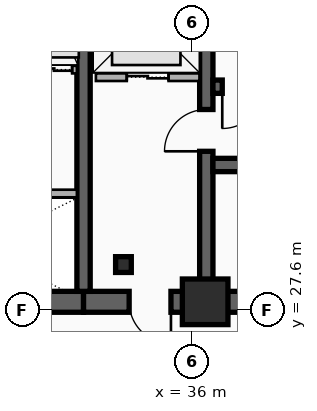
"""IFC4 building model, lengths in metres.
Left out: names, types, materials, properties, quantities, classifications, styles, units other than length and angle.
Written with IfcOpenShell. Run it as: python <this file> out.ifc"""

import sys

from ifc_helpers import new_model, si_unit, direction, frame, frame_2d, origin, origin_2d, place, context, subcontext, project, spatial, rectangle, i_section, extrude, element, fill, save


model = new_model("IFC4")
c1 = context("Model", 3, precision=1e-05, world=origin(), true_north=direction((0.0, 1.0)))
c2 = subcontext(c1, "Body", "Model", "MODEL_VIEW")
j1 = project(units=[si_unit("LENGTHUNIT", "METRE"), si_unit("PLANEANGLEUNIT", "RADIAN")], contexts=[c1])
p1 = place(None, origin())
s1 = spatial("IfcSite", under=j1, at=p1, CompositionType="ELEMENT")
p2 = place(p1, origin())
s2 = spatial("IfcBuilding", under=s1, at=p2, CompositionType="ELEMENT")
p3 = place(p2, frame((0.0, 0.0, 166.1)))
s3 = spatial("IfcBuildingStorey", under=s2, at=p3, CompositionType="ELEMENT", Elevation=166.1)
p4 = place(p3, frame((33.15, 27.82, 0.0), z_axis=(0.0, 0.0, 1.0), x_axis=(-1.0, 0.0, 0.0)))
e1 = element("IfcWall", 1, at=p4, inside=s3, PredefinedType="SHEAR", context=c2, shape_type="SweptSolid", body=[
    extrude(rectangle(XDim=11.97, YDim=0.55, at=frame_2d((5.985, 0.0))), origin(), (0.0, 0.0, 1.0), 3.55),
])
p5 = place(p4, frame((6.1, 0.0, 0.0)))
e2 = element("IfcOpeningElement", 2, at=p5, cuts=e1, PredefinedType="OPENING", context=c2, shape_type="SweptSolid", body=[
    extrude(rectangle(XDim=1.6, YDim=2.2, at=frame_2d((0.8, 1.1))), frame((0.0, 0.285, 0.0), z_axis=(0.0, -1.0, 0.0), x_axis=(1.0, 0.0, 0.0)), (0.0, 0.0, 1.0), 0.57),
])
p6 = place(p3, frame((45.38, 27.82, 0.0), z_axis=(0.0, 0.0, 1.0), x_axis=(-1.0, 0.0, 0.0)))
e3 = element("IfcWall", 3, at=p6, inside=s3, PredefinedType="SHEAR", context=c2, shape_type="SweptSolid", body=[
    extrude(rectangle(XDim=12.23, YDim=0.55, at=frame_2d((6.115, 0.0))), origin(), (0.0, 0.0, 1.0), 3.55),
])
p7 = place(p6, frame((9.93, 0.0, 0.0)))
e4 = element("IfcOpeningElement", 4, at=p7, cuts=e3, PredefinedType="OPENING", context=c2, shape_type="SweptSolid", body=[
    extrude(rectangle(XDim=1.1, YDim=2.15, at=frame_2d((0.55, 1.075))), frame((0.0, 0.285, 0.0), z_axis=(0.0, -1.0, 0.0), x_axis=(1.0, 0.0, 0.0)), (0.0, 0.0, 1.0), 0.57),
])
p8 = place(p6, frame((6.23, 0.0, 0.0)))
e5 = element("IfcOpeningElement", 5, at=p8, cuts=e3, PredefinedType="OPENING", context=c2, shape_type="SweptSolid", body=[
    extrude(rectangle(XDim=1.1, YDim=2.15, at=frame_2d((0.55, 1.075))), frame((0.0, 0.285, 0.0), z_axis=(0.0, -1.0, 0.0), x_axis=(1.0, 0.0, 0.0)), (0.0, 0.0, 1.0), 0.57),
])
p9 = place(p3, frame((33.15, 28.095, 0.0), z_axis=(0.0, 0.0, 1.0), x_axis=(0.0, 1.0, 0.0)))
e6 = element("IfcWall", 6, at=p9, inside=s3, PredefinedType="SHEAR", context=c2, shape_type="SweptSolid", body=[
    extrude(rectangle(XDim=8.68, YDim=0.35, at=frame_2d((4.34, 0.0))), origin(), (0.0, 0.0, 1.0), 3.55),
])
p10 = place(p3, frame((36.38, 28.095, 0.0), z_axis=(0.0, 0.0, 1.0), x_axis=(0.0, 1.0, 0.0)))
e7 = element("IfcWall", 7, at=p10, inside=s3, PredefinedType="SHEAR", context=c2, shape_type="SweptSolid", body=[
    extrude(rectangle(XDim=8.68, YDim=0.35, at=frame_2d((4.34, 0.0))), origin(), (0.0, 0.0, 1.0), 3.55),
])
p11 = place(p10, frame((3.685, 0.0, 0.0)))
e8 = element("IfcOpeningElement", 8, at=p11, cuts=e7, PredefinedType="OPENING", context=c2, shape_type="SweptSolid", body=[
    extrude(rectangle(XDim=1.1, YDim=2.15, at=frame_2d((0.55, 1.075))), frame((0.0, 0.185, 0.0), z_axis=(0.0, -1.0, 0.0), x_axis=(1.0, 0.0, 0.0)), (0.0, 0.0, 1.0), 0.37),
])
p12 = place(p3, frame((45.105, 33.48, 0.0), z_axis=(0.0, 0.0, 1.0), x_axis=(-1.0, 0.0, 0.0)))
e9 = element("IfcWall", 9, at=p12, inside=s3, PredefinedType="SHEAR", context=c2, shape_type="SweptSolid", body=[
    extrude(rectangle(XDim=8.55, YDim=0.35, at=frame_2d((4.275, 0.0))), origin(), (0.0, 0.0, 1.0), 3.55),
])
p13 = place(p12, frame((7.205, 0.0, 0.0)))
e10 = element("IfcOpeningElement", 10, at=p13, cuts=e9, PredefinedType="OPENING", context=c2, shape_type="SweptSolid", body=[
    extrude(rectangle(XDim=1.1, YDim=2.15, at=frame_2d((0.55, 1.075))), frame((0.0, 0.185, 0.0), z_axis=(0.0, -1.0, 0.0), x_axis=(1.0, 0.0, 0.0)), (0.0, 0.0, 1.0), 0.37),
])
p14 = place(p3, frame((36.555, 31.42, 0.0), z_axis=(0.0, 0.0, 1.0), x_axis=(1.0, 0.0, 0.0)))
e11 = element("IfcWall", 11, at=p14, inside=s3, PredefinedType="SHEAR", context=c2, shape_type="SweptSolid", body=[
    extrude(rectangle(XDim=8.55, YDim=0.35, at=frame_2d((4.275, 0.0))), origin(), (0.0, 0.0, 1.0), 3.55),
])
p15 = place(p3, frame((34.2, 28.8, 0.0), z_axis=(0.0, 0.0, 1.0), x_axis=(1.0, 0.0, 0.0)))
e12 = element("IfcColumn", 12, at=p15, inside=s3, PredefinedType="COLUMN", context=c2, shape_type="SweptSolid", body=[
    extrude(i_section(OverallWidth=0.413, OverallDepth=0.415, WebThickness=0.03, FlangeThickness=0.047, FilletRadius=0.015, at=origin_2d()), origin(), (0.0, 0.0, 1.0), 3.55),
])
p16 = place(p3, frame((36.35, 27.82, 0.0), z_axis=(0.0, 0.0, 1.0), x_axis=(1.0, 0.0, 0.0)))
e13 = element("IfcColumn", 13, at=p16, inside=s3, PredefinedType="COLUMN", context=c2, shape_type="SweptSolid", body=[
    extrude(rectangle(XDim=1.2, YDim=1.2, at=origin_2d()), origin(), (0.0, 0.0, 1.0), 3.55),
])
p17 = place(p3, frame((33.475, 33.73, 0.0), z_axis=(0.0, 0.0, 1.0), x_axis=(1.0, 0.0, 0.0)))
e14 = element("IfcWall", 14, at=p17, inside=s3, PredefinedType="PARTITIONING", context=c2, shape_type="SweptSolid", body=[
    extrude(rectangle(XDim=2.725, YDim=0.2, at=frame_2d((1.362, 0.0))), origin(), (0.0, 0.0, 1.0), 2.36),
])
p18 = place(p17, frame((0.812, 0.0, 0.0)))
e15 = element("IfcOpeningElement", 15, at=p18, cuts=e14, PredefinedType="OPENING", context=c2, shape_type="SweptSolid", body=[
    extrude(rectangle(XDim=1.1, YDim=2.15, at=frame_2d((0.55, 1.075))), frame((0.0, 0.11, 0.0), z_axis=(0.0, -1.0, 0.0), x_axis=(1.0, 0.0, 0.0)), (0.0, 0.0, 1.0), 0.22),
])
p19 = place(p3, frame((31.775, 30.67, 0.0), z_axis=(0.0, 0.0, 1.0), x_axis=(1.0, 0.0, 0.0)))
e16 = element("IfcWall", 16, at=p19, inside=s3, PredefinedType="PARTITIONING", context=c2, shape_type="SweptSolid", body=[
    extrude(rectangle(XDim=1.2, YDim=0.2, at=frame_2d((0.6, 0.0))), origin(), (0.0, 0.0, 1.0), 2.67),
])
p20 = place(p3, frame((31.775, 33.93, 0.0), z_axis=(0.0, 0.0, 1.0), x_axis=(1.0, 0.0, 0.0)))
e17 = element("IfcWall", 17, at=p20, inside=s3, PredefinedType="PARTITIONING", context=c2, shape_type="SweptSolid", body=[
    extrude(rectangle(XDim=1.2, YDim=0.2, at=frame_2d((0.6, 0.0))), origin(), (0.0, 0.0, 1.0), 3.29),
])
p21 = place(p20, frame((0.125, 0.0, 0.0)))
e18 = element("IfcOpeningElement", 18, at=p21, cuts=e17, PredefinedType="OPENING", context=c2, shape_type="SweptSolid", body=[
    extrude(rectangle(XDim=0.95, YDim=2.15, at=frame_2d((0.475, 1.075))), frame((0.0, 0.11, 0.0), z_axis=(0.0, -1.0, 0.0), x_axis=(1.0, 0.0, 0.0)), (0.0, 0.0, 1.0), 0.22),
])
p22 = place(p18, origin())
e19 = element("IfcDoor", 19, at=p22, inside=s3, OperationType="DOUBLE_DOOR_SLIDING", PredefinedType="DOOR", context=c2, shape_type="SweptSolid", body=[
    extrude(rectangle(XDim=1.1, YDim=2.15, at=frame_2d((0.55, 1.075))), frame((0.0, 0.025, 0.0), z_axis=(0.0, -1.0, 0.0), x_axis=(1.0, 0.0, 0.0)), (0.0, 0.0, 1.0), 0.05),
])
fill(e15, e19)
p23 = place(p21, origin())
e20 = element("IfcDoor", 20, at=p23, inside=s3, OperationType="DOUBLE_DOOR_SLIDING", PredefinedType="DOOR", context=c2, shape_type="SweptSolid", body=[
    extrude(rectangle(XDim=0.95, YDim=2.15, at=frame_2d((0.475, 1.075))), frame((0.0, 0.025, 0.0), z_axis=(0.0, -1.0, 0.0), x_axis=(1.0, 0.0, 0.0)), (0.0, 0.0, 1.0), 0.05),
])
fill(e18, e20)
p24 = place(p13, origin())
e21 = element("IfcDoor", 21, at=p24, inside=s3, OperationType="SINGLE_SWING_RIGHT", PredefinedType="DOOR", context=c2, shape_type="SweptSolid", body=[
    extrude(rectangle(XDim=1.1, YDim=2.15, at=frame_2d((0.55, 1.075))), frame((0.0, 0.025, 0.0), z_axis=(0.0, -1.0, 0.0), x_axis=(1.0, 0.0, 0.0)), (0.0, 0.0, 1.0), 0.05),
])
fill(e10, e21)
p25 = place(p11, origin())
e22 = element("IfcDoor", 22, at=p25, inside=s3, OperationType="SINGLE_SWING_LEFT", PredefinedType="DOOR", context=c2, shape_type="SweptSolid", body=[
    extrude(rectangle(XDim=1.1, YDim=2.15, at=frame_2d((0.55, 1.075))), frame((0.0, 0.025, 0.0), z_axis=(0.0, -1.0, 0.0), x_axis=(1.0, 0.0, 0.0)), (0.0, 0.0, 1.0), 0.05),
])
fill(e8, e22)
p26 = place(p7, origin())
e23 = element("IfcDoor", 23, at=p26, inside=s3, OperationType="SINGLE_SWING_LEFT", PredefinedType="DOOR", context=c2, shape_type="SweptSolid", body=[
    extrude(rectangle(XDim=1.1, YDim=2.15, at=frame_2d((0.55, 1.075))), frame((0.0, 0.025, 0.0), z_axis=(0.0, -1.0, 0.0), x_axis=(1.0, 0.0, 0.0)), (0.0, 0.0, 1.0), 0.05),
])
fill(e4, e23)
save(model, sys.argv[1])
